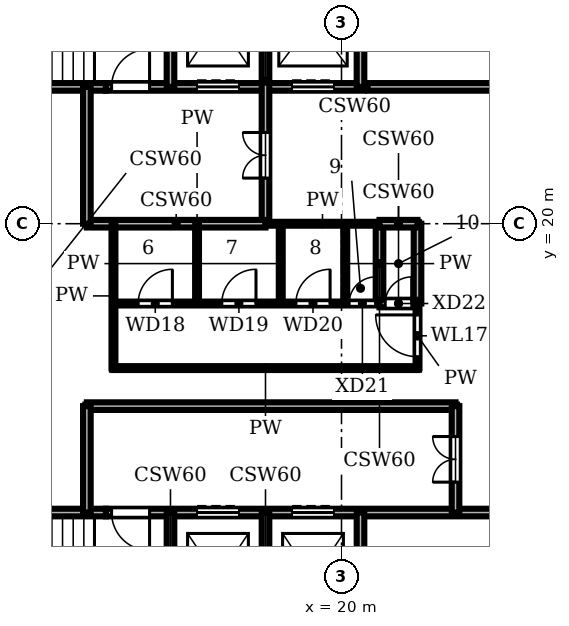
"""IFC4 building model, lengths in metres.
Left out: names, types, materials, properties, quantities, classifications, styles, units other than length and angle.
Written with IfcOpenShell. Run it as: python <this file> out.ifc"""

import sys

from ifc_helpers import new_model, si_unit, direction, frame, frame_2d, origin, place, context, subcontext, project, spatial, rectangle, extrude, element, fill, save


model = new_model("IFC4")
c1 = context("Model", 3, precision=1e-05, world=origin(), true_north=direction((0.0, 1.0)))
c2 = subcontext(c1, "Body", "Model", "MODEL_VIEW")
j1 = project(units=[si_unit("LENGTHUNIT", "METRE"), si_unit("PLANEANGLEUNIT", "RADIAN")], contexts=[c1])
p1 = place(None, origin())
s1 = spatial("IfcSite", under=j1, at=p1, CompositionType="ELEMENT")
p2 = place(p1, origin())
s2 = spatial("IfcBuilding", under=s1, at=p2, CompositionType="ELEMENT")
p3 = place(p2, frame((0.0, 0.0, 348.9)))
s3 = spatial("IfcBuildingStorey", under=s2, at=p3, CompositionType="ELEMENT", Elevation=348.9)
p4 = place(p3, frame((8.5, 12.4, 0.0), z_axis=(0.0, 0.0, 1.0), x_axis=(1.0, 0.0, 0.0)))
e1 = element("IfcWall", 1, at=p4, inside=s3, PredefinedType="SHEAR", context=c2, shape_type="SweptSolid", body=[
    extrude(rectangle(XDim=5.3, YDim=0.2, at=frame_2d((2.65, 0.0))), origin(), (0.0, 0.0, 1.0), 3.45),
])
p5 = place(p3, frame((13.8, 12.4, 0.0), z_axis=(0.0, 0.0, 1.0), x_axis=(1.0, 0.0, 0.0)))
e2 = element("IfcWall", 2, at=p5, inside=s3, PredefinedType="SHEAR", context=c2, shape_type="SweptSolid", body=[
    extrude(rectangle(XDim=13.7, YDim=0.2, at=frame_2d((6.85, 0.0))), origin(), (0.0, 0.0, 1.0), 3.45),
])
p6 = place(p5, frame((2.4, 0.0, 0.0)))
e3 = element("IfcOpeningElement", 3, at=p6, cuts=e2, PredefinedType="OPENING", context=c2, shape_type="SweptSolid", body=[
    extrude(rectangle(XDim=1.1, YDim=2.1, at=frame_2d((0.55, 1.05))), frame((0.0, 0.11, 0.0), z_axis=(0.0, -1.0, 0.0), x_axis=(1.0, 0.0, 0.0)), (0.0, 0.0, 1.0), 0.22),
])
p7 = place(p5, frame((4.9, 0.0, 0.0)))
e4 = element("IfcOpeningElement", 4, at=p7, cuts=e2, PredefinedType="OPENING", context=c2, shape_type="SweptSolid", body=[
    extrude(rectangle(XDim=1.1, YDim=2.1, at=frame_2d((0.55, 1.05))), frame((0.0, 0.11, 0.0), z_axis=(0.0, -1.0, 0.0), x_axis=(1.0, 0.0, 0.0)), (0.0, 0.0, 1.0), 0.22),
])
p8 = place(p5, frame((0.15, 0.0, 0.0)))
e5 = element("IfcOpeningElement", 5, at=p8, cuts=e2, PredefinedType="OPENING", context=c2, shape_type="SweptSolid", body=[
    extrude(rectangle(XDim=1.0, YDim=2.1, at=frame_2d((0.5, 1.05))), frame((0.0, 0.11, 0.0), z_axis=(0.0, -1.0, 0.0), x_axis=(1.0, 0.0, 0.0)), (0.0, 0.0, 1.0), 0.22),
])
p9 = place(p3, frame((13.3, 15.2, 0.0), z_axis=(0.0, 0.0, 1.0), x_axis=(1.0, 0.0, 0.0)))
e6 = element("IfcWall", 6, at=p9, inside=s3, PredefinedType="SHEAR", context=c2, shape_type="SweptSolid", body=[
    extrude(rectangle(XDim=9.7, YDim=0.2, at=frame_2d((4.85, 0.0))), origin(), (0.0, 0.0, 1.0), 3.45),
])
p10 = place(p3, frame((14.0, 16.2, 0.0), z_axis=(0.0, 0.0, 1.0), x_axis=(1.0, 0.0, 0.0)))
e7 = element("IfcWall", 7, at=p10, inside=s3, PredefinedType="PARTITIONING", context=c2, shape_type="SweptSolid", body=[
    extrude(rectangle(XDim=8.0, YDim=0.1, at=frame_2d((4.0, 0.0))), origin(), (0.0, 0.0, 1.0), 3.45),
])
p11 = place(p3, frame((14.0, 17.9, 0.0), z_axis=(0.0, 0.0, 1.0), x_axis=(1.0, 0.0, 0.0)))
e8 = element("IfcWall", 8, at=p11, inside=s3, PredefinedType="PARTITIONING", context=c2, shape_type="SweptSolid", body=[
    extrude(rectangle(XDim=7.0, YDim=0.1, at=frame_2d((3.5, 0.0))), origin(), (0.0, 0.0, 1.0), 3.45),
])
p12 = place(p11, frame((0.65, 0.0, 0.0)))
e9 = element("IfcOpeningElement", 9, at=p12, cuts=e8, PredefinedType="OPENING", context=c2, shape_type="SweptSolid", body=[
    extrude(rectangle(XDim=0.9, YDim=2.1, at=frame_2d((0.45, 1.05))), frame((0.0, 0.06, 0.0), z_axis=(0.0, -1.0, 0.0), x_axis=(1.0, 0.0, 0.0)), (0.0, 0.0, 1.0), 0.12),
])
p13 = place(p11, frame((2.85, 0.0, 0.0)))
e10 = element("IfcOpeningElement", 10, at=p13, cuts=e8, PredefinedType="OPENING", context=c2, shape_type="SweptSolid", body=[
    extrude(rectangle(XDim=0.9, YDim=2.1, at=frame_2d((0.45, 1.05))), frame((0.0, 0.06, 0.0), z_axis=(0.0, -1.0, 0.0), x_axis=(1.0, 0.0, 0.0)), (0.0, 0.0, 1.0), 0.12),
])
p14 = place(p11, frame((4.8, 0.0, 0.0)))
e11 = element("IfcOpeningElement", 11, at=p14, cuts=e8, PredefinedType="OPENING", context=c2, shape_type="SweptSolid", body=[
    extrude(rectangle(XDim=0.9, YDim=2.1, at=frame_2d((0.45, 1.05))), frame((0.0, 0.06, 0.0), z_axis=(0.0, -1.0, 0.0), x_axis=(1.0, 0.0, 0.0)), (0.0, 0.0, 1.0), 0.12),
])
p15 = place(p11, frame((6.2, 0.0, 0.0)))
e12 = element("IfcOpeningElement", 12, at=p15, cuts=e8, PredefinedType="OPENING", context=c2, shape_type="SweptSolid", body=[
    extrude(rectangle(XDim=0.7, YDim=2.1, at=frame_2d((0.35, 1.05))), frame((0.0, 0.06, 0.0), z_axis=(0.0, -1.0, 0.0), x_axis=(1.0, 0.0, 0.0)), (0.0, 0.0, 1.0), 0.12),
])
p16 = place(p3, frame((21.0, 17.9, 0.0), z_axis=(0.0, 0.0, 1.0), x_axis=(1.0, 0.0, 0.0)))
e13 = element("IfcWall", 13, at=p16, inside=s3, PredefinedType="SHEAR", context=c2, shape_type="SweptSolid", body=[
    extrude(rectangle(XDim=1.0, YDim=0.2, at=frame_2d((0.5, 0.0))), origin(), (0.0, 0.0, 1.0), 3.45),
])
p17 = place(p16, frame((0.15, 0.0, 0.0)))
e14 = element("IfcOpeningElement", 14, at=p17, cuts=e13, PredefinedType="OPENING", context=c2, shape_type="SweptSolid", body=[
    extrude(rectangle(XDim=0.7, YDim=2.1, at=frame_2d((0.35, 1.05))), frame((0.0, 0.11, 0.0), z_axis=(0.0, -1.0, 0.0), x_axis=(1.0, 0.0, 0.0)), (0.0, 0.0, 1.0), 0.22),
])
p18 = place(p3, frame((18.0, 20.0, 0.0), z_axis=(0.0, 0.0, 1.0), x_axis=(1.0, 0.0, 0.0)))
e15 = element("IfcWall", 15, at=p18, inside=s3, PredefinedType="PARTITIONING", context=c2, shape_type="SweptSolid", body=[
    extrude(rectangle(XDim=3.0, YDim=0.1, at=frame_2d((1.5, 0.0))), origin(), (0.0, 0.0, 1.0), 3.45),
])
p19 = place(p3, frame((13.3, 20.0, 0.0), z_axis=(0.0, 0.0, 1.0), x_axis=(1.0, 0.0, 0.0)))
e16 = element("IfcWall", 16, at=p19, inside=s3, PredefinedType="SHEAR", context=c2, shape_type="SweptSolid", body=[
    extrude(rectangle(XDim=4.7, YDim=0.2, at=frame_2d((2.35, 0.0))), origin(), (0.0, 0.0, 1.0), 3.45),
])
p20 = place(p3, frame((21.0, 20.0, 0.0), z_axis=(0.0, 0.0, 1.0), x_axis=(1.0, 0.0, 0.0)))
e17 = element("IfcWall", 17, at=p20, inside=s3, PredefinedType="SHEAR", context=c2, shape_type="SweptSolid", body=[
    extrude(rectangle(XDim=1.0, YDim=0.2, at=frame_2d((0.5, 0.0))), origin(), (0.0, 0.0, 1.0), 3.45),
])
p21 = place(p3, frame((8.5, 23.6, 0.0), z_axis=(0.0, 0.0, 1.0), x_axis=(1.0, 0.0, 0.0)))
e18 = element("IfcWall", 18, at=p21, inside=s3, PredefinedType="SHEAR", context=c2, shape_type="SweptSolid", body=[
    extrude(rectangle(XDim=5.3, YDim=0.2, at=frame_2d((2.65, 0.0))), origin(), (0.0, 0.0, 1.0), 3.45),
])
p22 = place(p3, frame((13.8, 23.6, 0.0), z_axis=(0.0, 0.0, 1.0), x_axis=(1.0, 0.0, 0.0)))
e19 = element("IfcWall", 19, at=p22, inside=s3, PredefinedType="SHEAR", context=c2, shape_type="SweptSolid", body=[
    extrude(rectangle(XDim=13.7, YDim=0.2, at=frame_2d((6.85, 0.0))), origin(), (0.0, 0.0, 1.0), 3.45),
])
p23 = place(p22, frame((2.4, 0.0, 0.0)))
e20 = element("IfcOpeningElement", 20, at=p23, cuts=e19, PredefinedType="OPENING", context=c2, shape_type="SweptSolid", body=[
    extrude(rectangle(XDim=1.1, YDim=2.1, at=frame_2d((0.55, 1.05))), frame((0.0, 0.11, 0.0), z_axis=(0.0, -1.0, 0.0), x_axis=(1.0, 0.0, 0.0)), (0.0, 0.0, 1.0), 0.22),
])
p24 = place(p22, frame((4.9, 0.0, 0.0)))
e21 = element("IfcOpeningElement", 21, at=p24, cuts=e19, PredefinedType="OPENING", context=c2, shape_type="SweptSolid", body=[
    extrude(rectangle(XDim=1.1, YDim=2.1, at=frame_2d((0.55, 1.05))), frame((0.0, 0.11, 0.0), z_axis=(0.0, -1.0, 0.0), x_axis=(1.0, 0.0, 0.0)), (0.0, 0.0, 1.0), 0.22),
])
p25 = place(p22, frame((0.15, 0.0, 0.0)))
e22 = element("IfcOpeningElement", 22, at=p25, cuts=e19, PredefinedType="OPENING", context=c2, shape_type="SweptSolid", body=[
    extrude(rectangle(XDim=1.0, YDim=2.1, at=frame_2d((0.5, 1.05))), frame((0.0, 0.11, 0.0), z_axis=(0.0, -1.0, 0.0), x_axis=(1.0, 0.0, 0.0)), (0.0, 0.0, 1.0), 0.22),
])
p26 = place(p3, frame((13.3, 12.4, 0.0), z_axis=(0.0, 0.0, 1.0), x_axis=(0.0, 1.0, 0.0)))
e23 = element("IfcWall", 23, at=p26, inside=s3, PredefinedType="SHEAR", context=c2, shape_type="SweptSolid", body=[
    extrude(rectangle(XDim=2.8, YDim=0.2, at=frame_2d((1.4, 0.0))), origin(), (0.0, 0.0, 1.0), 3.45),
])
p27 = place(p3, frame((13.3, 20.0, 0.0), z_axis=(0.0, 0.0, 1.0), x_axis=(0.0, 1.0, 0.0)))
e24 = element("IfcWall", 24, at=p27, inside=s3, PredefinedType="SHEAR", context=c2, shape_type="SweptSolid", body=[
    extrude(rectangle(XDim=3.6, YDim=0.2, at=frame_2d((1.8, 0.0))), origin(), (0.0, 0.0, 1.0), 3.45),
])
p28 = place(p3, frame((14.0, 16.2, 0.0), z_axis=(0.0, 0.0, 1.0), x_axis=(0.0, 1.0, 0.0)))
e25 = element("IfcWall", 25, at=p28, inside=s3, PredefinedType="PARTITIONING", context=c2, shape_type="SweptSolid", body=[
    extrude(rectangle(XDim=3.8, YDim=0.1, at=frame_2d((1.9, 0.0))), origin(), (0.0, 0.0, 1.0), 3.45),
])
for number, where, z_axis, x_axis in (
    (26, (15.5, 8.5, 0.0), (0.0, 0.0, 1.0), (0.0, 1.0, 0.0)),
    (27, (15.5, 23.6, 0.0), (0.0, 0.0, 1.0), (0.0, 1.0, 0.0)),
):
    element("IfcWall", number, at=place(p3, frame(where, z_axis=z_axis, x_axis=x_axis)), inside=s3, PredefinedType="SHEAR", context=c2, shape_type="SweptSolid", body=[
        extrude(rectangle(XDim=3.9, YDim=0.2, at=frame_2d((1.95, 0.0))), origin(), (0.0, 0.0, 1.0), 3.45),
    ])
p29 = place(p3, frame((16.2, 17.9, 0.0), z_axis=(0.0, 0.0, 1.0), x_axis=(0.0, 1.0, 0.0)))
e28 = element("IfcWall", 28, at=p29, inside=s3, PredefinedType="PARTITIONING", context=c2, shape_type="SweptSolid", body=[
    extrude(rectangle(XDim=2.1, YDim=0.1, at=frame_2d((1.05, 0.0))), origin(), (0.0, 0.0, 1.0), 3.45),
])
p30 = place(p3, frame((18.0, 8.5, 0.0), z_axis=(0.0, 0.0, 1.0), x_axis=(0.0, 1.0, 0.0)))
e29 = element("IfcWall", 29, at=p30, inside=s3, PredefinedType="SHEAR", context=c2, shape_type="SweptSolid", body=[
    extrude(rectangle(XDim=3.9, YDim=0.2, at=frame_2d((1.95, 0.0))), origin(), (0.0, 0.0, 1.0), 3.45),
])
p31 = place(p3, frame((18.0, 20.0, 0.0), z_axis=(0.0, 0.0, 1.0), x_axis=(0.0, 1.0, 0.0)))
e30 = element("IfcWall", 30, at=p31, inside=s3, PredefinedType="SHEAR", context=c2, shape_type="SweptSolid", body=[
    extrude(rectangle(XDim=7.5, YDim=0.2, at=frame_2d((3.75, 0.0))), origin(), (0.0, 0.0, 1.0), 3.45),
])
p32 = place(p31, frame((1.2, 0.0, 0.0)))
e31 = element("IfcOpeningElement", 31, at=p32, cuts=e30, PredefinedType="OPENING", context=c2, shape_type="SweptSolid", body=[
    extrude(rectangle(XDim=1.2, YDim=2.1, at=frame_2d((0.6, 1.05))), frame((0.0, 0.11, 0.0), z_axis=(0.0, -1.0, 0.0), x_axis=(1.0, 0.0, 0.0)), (0.0, 0.0, 1.0), 0.22),
])
for number, where, z_axis, x_axis in (
    (32, (18.4, 17.9, 0.0), (0.0, 0.0, 1.0), (0.0, 1.0, 0.0)),
    (33, (20.1, 17.9, 0.0), (0.0, 0.0, 1.0), (0.0, 1.0, 0.0)),
):
    element("IfcWall", number, at=place(p3, frame(where, z_axis=z_axis, x_axis=x_axis)), inside=s3, PredefinedType="PARTITIONING", context=c2, shape_type="SweptSolid", body=[
        extrude(rectangle(XDim=2.1, YDim=0.1, at=frame_2d((1.05, 0.0))), origin(), (0.0, 0.0, 1.0), 3.45),
    ])
for number, where, z_axis, x_axis in (
    (34, (20.5, 8.5, 0.0), (0.0, 0.0, 1.0), (0.0, 1.0, 0.0)),
    (35, (20.5, 23.6, 0.0), (0.0, 0.0, 1.0), (0.0, 1.0, 0.0)),
):
    element("IfcWall", number, at=place(p3, frame(where, z_axis=z_axis, x_axis=x_axis)), inside=s3, PredefinedType="SHEAR", context=c2, shape_type="SweptSolid", body=[
        extrude(rectangle(XDim=3.9, YDim=0.2, at=frame_2d((1.95, 0.0))), origin(), (0.0, 0.0, 1.0), 3.45),
    ])
p33 = place(p3, frame((21.0, 17.9, 0.0), z_axis=(0.0, 0.0, 1.0), x_axis=(0.0, 1.0, 0.0)))
e36 = element("IfcWall", 36, at=p33, inside=s3, PredefinedType="SHEAR", context=c2, shape_type="SweptSolid", body=[
    extrude(rectangle(XDim=2.1, YDim=0.2, at=frame_2d((1.05, 0.0))), origin(), (0.0, 0.0, 1.0), 3.45),
])
p34 = place(p3, frame((22.0, 16.2, 0.0), z_axis=(0.0, 0.0, 1.0), x_axis=(0.0, 1.0, 0.0)))
e37 = element("IfcWall", 37, at=p34, inside=s3, PredefinedType="PARTITIONING", context=c2, shape_type="SweptSolid", body=[
    extrude(rectangle(XDim=1.7, YDim=0.1, at=frame_2d((0.85, 0.0))), origin(), (0.0, 0.0, 1.0), 3.45),
])
p35 = place(p34, frame((0.3, 0.0, 0.0)))
e38 = element("IfcOpeningElement", 38, at=p35, cuts=e37, PredefinedType="OPENING", context=c2, shape_type="SweptSolid", body=[
    extrude(rectangle(XDim=1.1, YDim=2.1, at=frame_2d((0.55, 1.05))), frame((0.0, 0.06, 0.0), z_axis=(0.0, -1.0, 0.0), x_axis=(1.0, 0.0, 0.0)), (0.0, 0.0, 1.0), 0.12),
])
p36 = place(p3, frame((22.0, 17.9, 0.0), z_axis=(0.0, 0.0, 1.0), x_axis=(0.0, 1.0, 0.0)))
e39 = element("IfcWall", 39, at=p36, inside=s3, PredefinedType="SHEAR", context=c2, shape_type="SweptSolid", body=[
    extrude(rectangle(XDim=2.1, YDim=0.2, at=frame_2d((1.05, 0.0))), origin(), (0.0, 0.0, 1.0), 3.45),
])
p37 = place(p3, frame((23.0, 12.4, 0.0), z_axis=(0.0, 0.0, 1.0), x_axis=(0.0, 1.0, 0.0)))
e40 = element("IfcWall", 40, at=p37, inside=s3, PredefinedType="SHEAR", context=c2, shape_type="SweptSolid", body=[
    extrude(rectangle(XDim=2.8, YDim=0.2, at=frame_2d((1.4, 0.0))), origin(), (0.0, 0.0, 1.0), 3.45),
])
p38 = place(p37, frame((0.8, 0.0, 0.0)))
e41 = element("IfcOpeningElement", 41, at=p38, cuts=e40, PredefinedType="OPENING", context=c2, shape_type="SweptSolid", body=[
    extrude(rectangle(XDim=1.2, YDim=2.1, at=frame_2d((0.6, 1.05))), frame((0.0, 0.11, 0.0), z_axis=(0.0, -1.0, 0.0), x_axis=(1.0, 0.0, 0.0)), (0.0, 0.0, 1.0), 0.22),
])
p39 = place(p6, origin())
e42 = element("IfcDoor", 42, at=p39, inside=s3, OperationType="DOUBLE_DOOR_SLIDING", PredefinedType="DOOR", context=c2, shape_type="SweptSolid", body=[
    extrude(rectangle(XDim=1.1, YDim=2.1, at=frame_2d((0.55, 1.05))), frame((0.0, 0.025, 0.0), z_axis=(0.0, -1.0, 0.0), x_axis=(1.0, 0.0, 0.0)), (0.0, 0.0, 1.0), 0.05),
])
fill(e3, e42)
p40 = place(p7, origin())
e43 = element("IfcDoor", 43, at=p40, inside=s3, OperationType="DOUBLE_DOOR_SLIDING", PredefinedType="DOOR", context=c2, shape_type="SweptSolid", body=[
    extrude(rectangle(XDim=1.1, YDim=2.1, at=frame_2d((0.55, 1.05))), frame((0.0, 0.025, 0.0), z_axis=(0.0, -1.0, 0.0), x_axis=(1.0, 0.0, 0.0)), (0.0, 0.0, 1.0), 0.05),
])
fill(e4, e43)
p41 = place(p23, origin())
e44 = element("IfcDoor", 44, at=p41, inside=s3, OperationType="DOUBLE_DOOR_SLIDING", PredefinedType="DOOR", context=c2, shape_type="SweptSolid", body=[
    extrude(rectangle(XDim=1.1, YDim=2.1, at=frame_2d((0.55, 1.05))), frame((0.0, 0.025, 0.0), z_axis=(0.0, -1.0, 0.0), x_axis=(1.0, 0.0, 0.0)), (0.0, 0.0, 1.0), 0.05),
])
fill(e20, e44)
p42 = place(p24, origin())
e45 = element("IfcDoor", 45, at=p42, inside=s3, OperationType="DOUBLE_DOOR_SLIDING", PredefinedType="DOOR", context=c2, shape_type="SweptSolid", body=[
    extrude(rectangle(XDim=1.1, YDim=2.1, at=frame_2d((0.55, 1.05))), frame((0.0, 0.025, 0.0), z_axis=(0.0, -1.0, 0.0), x_axis=(1.0, 0.0, 0.0)), (0.0, 0.0, 1.0), 0.05),
])
fill(e21, e45)
p43 = place(p8, frame((1.0, 0.0, 0.0), z_axis=(0.0, 0.0, 1.0), x_axis=(-1.0, 0.0, 0.0)))
e46 = element("IfcDoor", 46, at=p43, inside=s3, OperationType="SINGLE_SWING_LEFT", PredefinedType="DOOR", context=c2, shape_type="SweptSolid", body=[
    extrude(rectangle(XDim=1.0, YDim=2.1, at=frame_2d((0.5, 1.05))), frame((0.0, 0.025, 0.0), z_axis=(0.0, -1.0, 0.0), x_axis=(1.0, 0.0, 0.0)), (0.0, 0.0, 1.0), 0.05),
])
fill(e5, e46)
p44 = place(p25, origin())
e47 = element("IfcDoor", 47, at=p44, inside=s3, OperationType="SINGLE_SWING_RIGHT", PredefinedType="DOOR", context=c2, shape_type="SweptSolid", body=[
    extrude(rectangle(XDim=1.0, YDim=2.1, at=frame_2d((0.5, 1.05))), frame((0.0, 0.025, 0.0), z_axis=(0.0, -1.0, 0.0), x_axis=(1.0, 0.0, 0.0)), (0.0, 0.0, 1.0), 0.05),
])
fill(e22, e47)
p45 = place(p38, origin())
e48 = element("IfcDoor", 48, at=p45, inside=s3, OperationType="DOUBLE_DOOR_SINGLE_SWING", PredefinedType="DOOR", context=c2, shape_type="SweptSolid", body=[
    extrude(rectangle(XDim=1.2, YDim=2.1, at=frame_2d((0.6, 1.05))), frame((0.0, 0.025, 0.0), z_axis=(0.0, -1.0, 0.0), x_axis=(1.0, 0.0, 0.0)), (0.0, 0.0, 1.0), 0.05),
])
fill(e41, e48)
p46 = place(p32, origin())
e49 = element("IfcDoor", 49, at=p46, inside=s3, OperationType="DOUBLE_DOOR_SINGLE_SWING", PredefinedType="DOOR", context=c2, shape_type="SweptSolid", body=[
    extrude(rectangle(XDim=1.2, YDim=2.1, at=frame_2d((0.6, 1.05))), frame((0.0, 0.025, 0.0), z_axis=(0.0, -1.0, 0.0), x_axis=(1.0, 0.0, 0.0)), (0.0, 0.0, 1.0), 0.05),
])
fill(e31, e49)
p47 = place(p35, origin())
e50 = element("IfcDoor", 50, at=p47, inside=s3, OperationType="SINGLE_SWING_RIGHT", PredefinedType="DOOR", context=c2, shape_type="SweptSolid", body=[
    extrude(rectangle(XDim=1.1, YDim=2.1, at=frame_2d((0.55, 1.05))), frame((0.0, 0.025, 0.0), z_axis=(0.0, -1.0, 0.0), x_axis=(1.0, 0.0, 0.0)), (0.0, 0.0, 1.0), 0.05),
])
fill(e38, e50)
p48 = place(p12, origin())
e51 = element("IfcDoor", 51, at=p48, inside=s3, OperationType="SINGLE_SWING_RIGHT", PredefinedType="DOOR", context=c2, shape_type="SweptSolid", body=[
    extrude(rectangle(XDim=0.9, YDim=2.1, at=frame_2d((0.45, 1.05))), frame((0.0, 0.025, 0.0), z_axis=(0.0, -1.0, 0.0), x_axis=(1.0, 0.0, 0.0)), (0.0, 0.0, 1.0), 0.05),
])
fill(e9, e51)
p49 = place(p13, origin())
e52 = element("IfcDoor", 52, at=p49, inside=s3, OperationType="SINGLE_SWING_RIGHT", PredefinedType="DOOR", context=c2, shape_type="SweptSolid", body=[
    extrude(rectangle(XDim=0.9, YDim=2.1, at=frame_2d((0.45, 1.05))), frame((0.0, 0.025, 0.0), z_axis=(0.0, -1.0, 0.0), x_axis=(1.0, 0.0, 0.0)), (0.0, 0.0, 1.0), 0.05),
])
fill(e10, e52)
p50 = place(p14, origin())
e53 = element("IfcDoor", 53, at=p50, inside=s3, OperationType="SINGLE_SWING_RIGHT", PredefinedType="DOOR", context=c2, shape_type="SweptSolid", body=[
    extrude(rectangle(XDim=0.9, YDim=2.1, at=frame_2d((0.45, 1.05))), frame((0.0, 0.025, 0.0), z_axis=(0.0, -1.0, 0.0), x_axis=(1.0, 0.0, 0.0)), (0.0, 0.0, 1.0), 0.05),
])
fill(e11, e53)
p51 = place(p15, origin())
e54 = element("IfcDoor", 54, at=p51, inside=s3, OperationType="SINGLE_SWING_RIGHT", PredefinedType="DOOR", context=c2, shape_type="SweptSolid", body=[
    extrude(rectangle(XDim=0.7, YDim=2.1, at=frame_2d((0.35, 1.05))), frame((0.0, 0.025, 0.0), z_axis=(0.0, -1.0, 0.0), x_axis=(1.0, 0.0, 0.0)), (0.0, 0.0, 1.0), 0.05),
])
fill(e12, e54)
p52 = place(p17, origin())
e55 = element("IfcDoor", 55, at=p52, inside=s3, OperationType="SINGLE_SWING_RIGHT", PredefinedType="DOOR", context=c2, shape_type="SweptSolid", body=[
    extrude(rectangle(XDim=0.7, YDim=2.1, at=frame_2d((0.35, 1.05))), frame((0.0, 0.025, 0.0), z_axis=(0.0, -1.0, 0.0), x_axis=(1.0, 0.0, 0.0)), (0.0, 0.0, 1.0), 0.05),
])
fill(e14, e55)
save(model, sys.argv[1])
